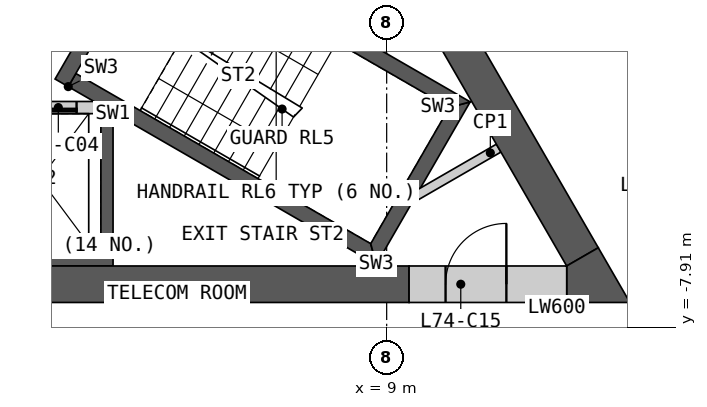
"""IFC4 building model, lengths in metres.
Left out: names, types, materials, properties, quantities, classifications, styles, units other than length and angle.
Written with IfcOpenShell. Run it as: python <this file> out.ifc"""

import sys

from ifc_helpers import new_model, si_unit, direction, frame, frame_2d, origin, place, context, subcontext, project, spatial, polyline, rectangle, outline, extrude, element, fill, save


model = new_model("IFC4")
c1 = context("Model", 3, precision=1e-05, world=origin(), true_north=direction((0.0, 1.0)))
c2 = subcontext(c1, "Body", "Model", "MODEL_VIEW")
j1 = project(units=[si_unit("LENGTHUNIT", "METRE"), si_unit("PLANEANGLEUNIT", "RADIAN")], contexts=[c1])
p1 = place(None, origin())
s1 = spatial("IfcSite", under=j1, at=p1, CompositionType="ELEMENT")
p2 = place(p1, origin())
s2 = spatial("IfcBuilding", under=s1, at=p2, CompositionType="ELEMENT")
p3 = place(p2, frame((0.0, 0.0, 332.4)))
s3 = spatial("IfcBuildingStorey", under=s2, at=p3, CompositionType="ELEMENT", Elevation=332.4)
p4 = place(p3, origin())
e1 = element("IfcWall", 1, at=p4, inside=s3, PredefinedType="SHEAR", context=c2, shape_type="SweptSolid", body=[
    extrude(outline(polyline([(4.5, -4.4), (4.5, -6.906), (-4.5, -6.906), (-4.5, -4.4), (-4.3, -4.4), (-4.3, -6.7), (-2.3, -6.7), (-2.3, -4.4), (-2.1, -4.4), (-2.1, -6.7), (-0.1, -6.7), (-0.1, -4.4), (0.1, -4.4), (0.1, -6.7), (2.1, -6.7), (2.1, -4.4), (2.3, -4.4), (2.3, -6.7), (4.3, -6.7), (4.3, -4.4), (4.5, -4.4)])), origin(), (0.0, 0.0, 1.0), 3.1),
])
p5 = place(p3, frame((-4.187, -4.3, 0.0), z_axis=(0.0, 0.0, 1.0), x_axis=(1.0, 0.0, 0.0)))
e2 = element("IfcWall", 2, at=p5, inside=s3, PredefinedType="SOLIDWALL", context=c2, shape_type="SweptSolid", body=[
    extrude(rectangle(XDim=8.373, YDim=0.2, at=frame_2d((4.187, 0.0))), origin(), (0.0, 0.0, 1.0), 3.1),
])
p6 = place(p5, frame((0.287, 0.0, 0.0)))
e3 = element("IfcOpeningElement", 3, at=p6, cuts=e2, PredefinedType="OPENING", context=c2, shape_type="SweptSolid", body=[
    extrude(rectangle(XDim=1.2, YDim=2.1, at=frame_2d((0.6, 1.05))), frame((0.0, 0.11, 0.0), z_axis=(0.0, -1.0, 0.0), x_axis=(1.0, 0.0, 0.0)), (0.0, 0.0, 1.0), 0.22),
])
p7 = place(p5, frame((2.387, 0.0, 0.0)))
e4 = element("IfcOpeningElement", 4, at=p7, cuts=e2, PredefinedType="OPENING", context=c2, shape_type="SweptSolid", body=[
    extrude(rectangle(XDim=1.4, YDim=2.1, at=frame_2d((0.7, 1.05))), frame((0.0, 0.11, 0.0), z_axis=(0.0, -1.0, 0.0), x_axis=(1.0, 0.0, 0.0)), (0.0, 0.0, 1.0), 0.22),
])
p8 = place(p5, frame((4.737, 0.0, 0.0)))
e5 = element("IfcOpeningElement", 5, at=p8, cuts=e2, PredefinedType="OPENING", context=c2, shape_type="SweptSolid", body=[
    extrude(rectangle(XDim=1.1, YDim=2.1, at=frame_2d((0.55, 1.05))), frame((0.0, 0.11, 0.0), z_axis=(0.0, -1.0, 0.0), x_axis=(1.0, 0.0, 0.0)), (0.0, 0.0, 1.0), 0.22),
])
p9 = place(p5, frame((6.887, 0.0, 0.0)))
e6 = element("IfcOpeningElement", 6, at=p9, cuts=e2, PredefinedType="OPENING", context=c2, shape_type="SweptSolid", body=[
    extrude(rectangle(XDim=1.2, YDim=2.1, at=frame_2d((0.6, 1.05))), frame((0.0, 0.11, 0.0), z_axis=(0.0, -1.0, 0.0), x_axis=(1.0, 0.0, 0.0)), (0.0, 0.0, 1.0), 0.22),
])
p10 = place(p3, origin())
e7 = element("IfcWall", 7, at=p10, inside=s3, PredefinedType="SHEAR", context=c2, shape_type="SweptSolid", body=[
    extrude(outline(polyline([(3.763, -3.956), (8.83, -6.881), (8.738, -6.539), (3.888, -3.739), (3.763, -3.956)])), origin(), (0.0, 0.0, 1.0), 3.1),
])
p11 = place(p3, origin())
e8 = element("IfcWall", 8, at=p11, inside=s3, PredefinedType="SHEAR", context=c2, shape_type="SweptSolid", body=[
    extrude(outline(polyline([(8.83, -6.881), (10.374, -4.206), (10.032, -4.298), (8.738, -6.539), (8.83, -6.881)])), origin(), (0.0, 0.0, 1.0), 3.1),
])
p12 = place(p3, origin())
e9 = element("IfcWall", 9, at=p12, inside=s3, PredefinedType="SHEAR", context=c2, shape_type="SweptSolid", body=[
    extrude(outline(polyline([(10.032, -4.298), (10.374, -4.206), (5.307, -1.281), (5.182, -1.498), (10.032, -4.298)])), origin(), (0.0, 0.0, 1.0), 3.1),
])
p13 = place(p3, frame((3.655, -3.893, 0.0), z_axis=(0.0, 0.0, 1.0), x_axis=(0.499982516597, 0.866035497597, 0.0)))
e10 = element("IfcWall", 10, at=p13, inside=s3, PredefinedType="SHEAR", context=c2, shape_type="SweptSolid", body=[
    extrude(rectangle(XDim=3.088, YDim=0.25, at=frame_2d((1.544, 0.0))), origin(), (0.0, 0.0, 1.0), 3.1),
])
p14 = place(p13, frame((0.994, 0.0, 0.0)))
e11 = element("IfcOpeningElement", 11, at=p14, cuts=e10, PredefinedType="OPENING", context=c2, shape_type="SweptSolid", body=[
    extrude(rectangle(XDim=1.1, YDim=2.1, at=frame_2d((0.55, 1.05))), frame((0.0, 0.135, 0.0), z_axis=(0.0, -1.0, 0.0), x_axis=(1.0, 0.0, 0.0)), (0.0, 0.0, 1.0), 0.27),
])
p15 = place(p3, frame((10.842, -4.967, 0.0), z_axis=(0.0, 0.0, 1.0), x_axis=(-0.866098216386, -0.499873863663, 0.0)))
e12 = element("IfcWall", 12, at=p15, inside=s3, PredefinedType="PARTITIONING", context=c2, shape_type="SweptSolid", body=[
    extrude(rectangle(XDim=1.582, YDim=0.15, at=frame_2d((0.791, 0.0))), origin(), (0.0, 0.0, 1.0), 3.1),
])
p16 = place(p3, frame((-4.892, -7.206, 0.0), z_axis=(0.0, 0.0, 1.0), x_axis=(1.0, 0.0, 0.0)))
e13 = element("IfcWall", 13, at=p16, inside=s3, PredefinedType="SHEAR", context=c2, shape_type="SweptSolid", body=[
    extrude(rectangle(XDim=14.261, YDim=0.6, at=frame_2d((7.13, 0.0))), origin(), (0.0, 0.0, 1.0), 3.1),
])
p17 = place(p3, frame((12.221, -6.756, 0.0), z_axis=(0.0, 0.0, 1.0), x_axis=(-0.500020646047, 0.866013483456, 0.0)))
e14 = element("IfcWall", 14, at=p17, inside=s3, PredefinedType="SHEAR", context=c2, shape_type="SweptSolid", body=[
    extrude(rectangle(XDim=4.559, YDim=0.6, at=frame_2d((2.28, 0.0))), origin(), (0.0, 0.0, 1.0), 3.1),
])
p18 = place(p3, origin())
e15 = element("IfcWall", 15, at=p18, inside=s3, PredefinedType="SHEAR", context=c2, shape_type="SweptSolid", body=[
    extrude(outline(polyline([(11.961, -7.506), (11.961, -6.906), (12.48, -6.606), (13.0, -7.506), (11.961, -7.506)])), origin(), (0.0, 0.0, 1.0), 3.1),
])
p19 = place(p3, frame((9.369, -7.206, 0.0), z_axis=(0.0, 0.0, 1.0), x_axis=(1.0, 0.0, 0.0)))
e16 = element("IfcWall", 16, at=p19, inside=s3, PredefinedType="SHEAR", context=c2, shape_type="SweptSolid", body=[
    extrude(rectangle(XDim=2.592, YDim=0.6, at=frame_2d((1.296, 0.0))), origin(), (0.0, 0.0, 1.0), 3.1),
])
p20 = place(p19, frame((0.6, 0.0, 0.0)))
e17 = element("IfcOpeningElement", 17, at=p20, cuts=e16, PredefinedType="OPENING", context=c2, shape_type="SweptSolid", body=[
    extrude(rectangle(XDim=1.0, YDim=2.1, at=frame_2d((0.5, 1.05))), frame((0.0, 0.31, 0.0), z_axis=(0.0, -1.0, 0.0), x_axis=(1.0, 0.0, 0.0)), (0.0, 0.0, 1.0), 0.62),
])
p21 = place(p3, frame((12.988, -2.684, 0.0), z_axis=(0.0, 0.0, 1.0), x_axis=(0.500003406062, -0.866023437285, 0.0)))
e18 = element("IfcWall", 18, at=p21, inside=s3, PredefinedType="PARTITIONING", context=c2, shape_type="SweptSolid", body=[
    extrude(rectangle(XDim=4.288, YDim=0.2, at=frame_2d((2.144, 0.0))), origin(), (0.0, 0.0, 1.0), 3.1),
])
p22 = place(p21, frame((2.521, 0.0, 0.0)))
e19 = element("IfcOpeningElement", 19, at=p22, cuts=e18, PredefinedType="OPENING", context=c2, shape_type="SweptSolid", body=[
    extrude(rectangle(XDim=1.0, YDim=2.1, at=frame_2d((0.5, 1.05))), frame((0.0, 0.11, 0.0), z_axis=(0.0, -1.0, 0.0), x_axis=(1.0, 0.0, 0.0)), (0.0, 0.0, 1.0), 0.22),
])
p23 = place(p9, origin())
e20 = element("IfcDoor", 20, at=p23, inside=s3, OperationType="SLIDING_TO_LEFT", PredefinedType="DOOR", context=c2, shape_type="SweptSolid", body=[
    extrude(rectangle(XDim=1.2, YDim=2.1, at=frame_2d((0.6, 1.05))), frame((0.0, 0.025, 0.0), z_axis=(0.0, -1.0, 0.0), x_axis=(1.0, 0.0, 0.0)), (0.0, 0.0, 1.0), 0.05),
])
fill(e6, e20)
p24 = place(p20, origin())
e21 = element("IfcDoor", 21, at=p24, inside=s3, OperationType="SINGLE_SWING_RIGHT", PredefinedType="DOOR", context=c2, shape_type="SweptSolid", body=[
    extrude(rectangle(XDim=1.0, YDim=2.1, at=frame_2d((0.5, 1.05))), frame((0.0, 0.055, 0.0), z_axis=(0.0, -1.0, 0.0), x_axis=(1.0, 0.0, 0.0)), (0.0, 0.0, 1.0), 0.05),
])
fill(e17, e21)
save(model, sys.argv[1])
